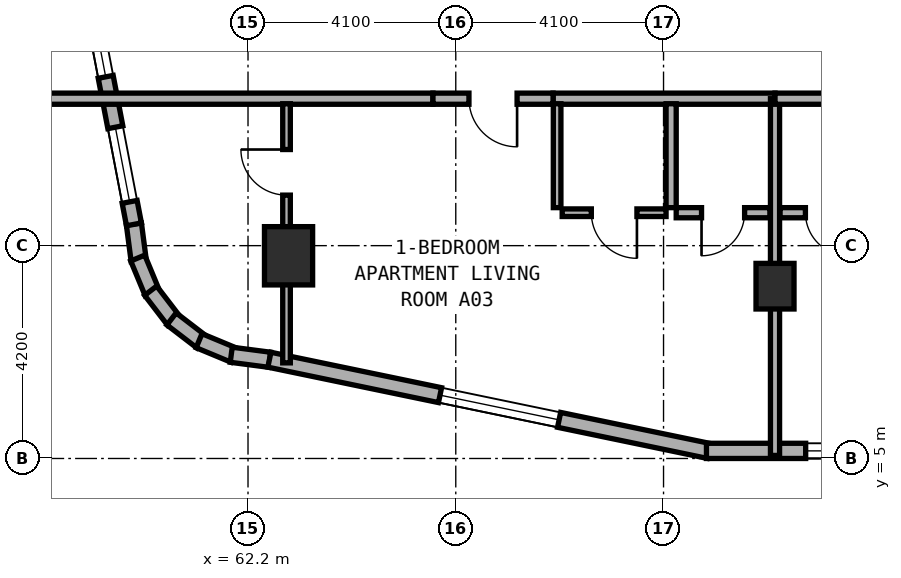
"""IFC4 building model, lengths in metres.
Left out: names, types, materials, properties, quantities, classifications, styles, units other than length and angle.
Written with IfcOpenShell. Run it as: python <this file> out.ifc"""

import sys

from ifc_helpers import new_model, si_unit, direction, frame, frame_2d, origin, origin_2d, place, context, subcontext, project, spatial, rectangle, extrude, element, fill, save


model = new_model("IFC4")
c1 = context("Model", 3, precision=1e-05, world=origin(), true_north=direction((0.0, 1.0)))
c2 = subcontext(c1, "Body", "Model", "MODEL_VIEW")
j1 = project(units=[si_unit("LENGTHUNIT", "METRE"), si_unit("PLANEANGLEUNIT", "RADIAN")], contexts=[c1])
p1 = place(None, origin())
s1 = spatial("IfcSite", under=j1, at=p1, CompositionType="ELEMENT")
p2 = place(p1, origin())
s2 = spatial("IfcBuilding", under=s1, at=p2, CompositionType="ELEMENT")
p3 = place(p2, frame((0.0, 0.0, 59.0)))
s3 = spatial("IfcBuildingStorey", under=s2, at=p3, CompositionType="ELEMENT", Elevation=59.0)
p4 = place(p3, frame((72.6, 8.4, 0.0), z_axis=(0.0, 0.0, 1.0), x_axis=(1.0, 0.0, 0.0)))
e1 = element("IfcColumn", 1, at=p4, inside=s3, PredefinedType="COLUMN", context=c2, shape_type="SweptSolid", body=[
    extrude(rectangle(XDim=0.75, YDim=0.9, at=origin_2d()), origin(), (0.0, 0.0, 1.0), 3.5),
])
p5 = place(p3, frame((63.0, 9.0, 0.0), z_axis=(0.0, 0.0, 1.0), x_axis=(1.0, 0.0, 0.0)))
e2 = element("IfcColumn", 2, at=p5, inside=s3, PredefinedType="COLUMN", context=c2, shape_type="SweptSolid", body=[
    extrude(rectangle(XDim=0.95, YDim=1.15, at=origin_2d()), origin(), (0.0, 0.0, 1.0), 3.5),
])
p6 = place(p3, frame((59.948, 9.627, 0.0), z_axis=(0.0, 0.0, 1.0), x_axis=(0.130255288807, -0.991480488834, 0.0)))
e3 = element("IfcWall", 3, at=p6, inside=s3, PredefinedType="STANDARD", context=c2, shape_type="SweptSolid", body=[
    extrude(rectangle(XDim=0.729, YDim=0.3, at=frame_2d((0.365, 0.0))), origin(), (0.0, 0.0, 1.0), 3.25),
])
for number, where, z_axis, x_axis in (
    (4, (60.024, 8.955, 0.0), (0.0, 0.0, 1.0), (0.384, -0.924, 0.0)),
    (5, (60.279, 8.311, 0.0), (0.0, 0.0, 1.0), (0.608, -0.794, 0.0)),
    (6, (60.691, 7.754, 0.0), (0.0, 0.0, 1.0), (0.794, -0.608, 0.0)),
    (7, (61.234, 7.324, 0.0), (0.0, 0.0, 1.0), (0.924, -0.383, 0.0)),
):
    element("IfcWall", number, at=place(p3, frame(where, z_axis=z_axis, x_axis=x_axis)), inside=s3, PredefinedType="STANDARD", context=c2, shape_type="SweptSolid", body=[
        extrude(rectangle(XDim=0.746, YDim=0.3, at=frame_2d((0.373, 0.0))), origin(), (0.0, 0.0, 1.0), 3.25),
    ])
p7 = place(p3, frame((61.869, 7.047, 0.0), z_axis=(0.0, 0.0, 1.0), x_axis=(0.991559404866, -0.129653178221, 0.0)))
e8 = element("IfcWall", 8, at=p7, inside=s3, PredefinedType="STANDARD", context=c2, shape_type="SweptSolid", body=[
    extrude(rectangle(XDim=0.764, YDim=0.3, at=frame_2d((0.382, 0.0))), origin(), (0.0, 0.0, 1.0), 3.25),
])
p8 = place(p3, frame((62.622, 6.949, 0.0), z_axis=(0.0, 0.0, 1.0), x_axis=(0.979119654102, -0.203284782882, 0.0)))
e9 = element("IfcWall", 9, at=p8, inside=s3, PredefinedType="STANDARD", context=c2, shape_type="SweptSolid", body=[
    extrude(rectangle(XDim=8.855, YDim=0.3, at=frame_2d((4.427, 0.0))), origin(), (0.0, 0.0, 1.0), 3.25),
])
p9 = place(p8, frame((3.439, 0.0, 0.8)))
e10 = element("IfcOpeningElement", 10, at=p9, cuts=e9, PredefinedType="OPENING", context=c2, shape_type="SweptSolid", body=[
    extrude(rectangle(XDim=2.4, YDim=1.6, at=frame_2d((1.2, 0.8))), frame((0.0, 0.16, 0.0), z_axis=(0.0, -1.0, 0.0), x_axis=(1.0, 0.0, 0.0)), (0.0, 0.0, 1.0), 0.32),
])
p10 = place(p3, frame((71.247, 5.15, 0.0), z_axis=(0.0, 0.0, 1.0), x_axis=(1.0, 0.0, 0.0)))
e11 = element("IfcWall", 11, at=p10, inside=s3, PredefinedType="STANDARD", context=c2, shape_type="SweptSolid", body=[
    extrude(rectangle(XDim=11.391, YDim=0.3, at=frame_2d((5.695, 0.0))), origin(), (0.0, 0.0, 1.0), 3.25),
])
p11 = place(p10, frame((5.113, 0.0, 0.0)))
e12 = element("IfcOpeningElement", 12, at=p11, cuts=e11, PredefinedType="OPENING", context=c2, shape_type="SweptSolid", body=[
    extrude(rectangle(XDim=1.2, YDim=2.15, at=frame_2d((0.6, 1.075))), frame((0.0, 0.16, 0.0), z_axis=(0.0, -1.0, 0.0), x_axis=(1.0, 0.0, 0.0)), (0.0, 0.0, 1.0), 0.32),
])
p12 = place(p10, frame((1.958, 0.0, 0.8)))
e13 = element("IfcOpeningElement", 13, at=p12, cuts=e11, PredefinedType="OPENING", context=c2, shape_type="SweptSolid", body=[
    extrude(rectangle(XDim=2.4, YDim=1.6, at=frame_2d((1.2, 0.8))), frame((0.0, 0.16, 0.0), z_axis=(0.0, -1.0, 0.0), x_axis=(1.0, 0.0, 0.0)), (0.0, 0.0, 1.0), 0.32),
])
p13 = place(p10, frame((7.108, 0.0, 0.8)))
e14 = element("IfcOpeningElement", 14, at=p13, cuts=e11, PredefinedType="OPENING", context=c2, shape_type="SweptSolid", body=[
    extrude(rectangle(XDim=2.4, YDim=1.6, at=frame_2d((1.2, 0.8))), frame((0.0, 0.16, 0.0), z_axis=(0.0, -1.0, 0.0), x_axis=(1.0, 0.0, 0.0)), (0.0, 0.0, 1.0), 0.32),
])
p14 = place(p3, frame((58.137, 19.082, 0.0), z_axis=(0.0, 0.0, 1.0), x_axis=(0.188087874316, -0.982152203854, 0.0)))
e15 = element("IfcWall", 15, at=p14, inside=s3, PredefinedType="STANDARD", context=c2, shape_type="SweptSolid", body=[
    extrude(rectangle(XDim=9.634, YDim=0.3, at=frame_2d((4.817, 0.0))), origin(), (0.0, 0.0, 1.0), 3.25),
])
p15 = place(p14, frame((1.255, 0.0, 0.8)))
e16 = element("IfcOpeningElement", 16, at=p15, cuts=e15, PredefinedType="OPENING", context=c2, shape_type="SweptSolid", body=[
    extrude(rectangle(XDim=2.4, YDim=1.6, at=frame_2d((1.2, 0.8))), frame((0.0, 0.16, 0.0), z_axis=(0.0, -1.0, 0.0), x_axis=(1.0, 0.0, 0.0)), (0.0, 0.0, 1.0), 0.32),
])
p16 = place(p14, frame((5.47, 0.0, 0.85)))
e17 = element("IfcOpeningElement", 17, at=p16, cuts=e15, PredefinedType="OPENING", context=c2, shape_type="SweptSolid", body=[
    extrude(rectangle(XDim=1.2, YDim=1.5, at=frame_2d((0.6, 0.75))), frame((0.0, 0.16, 0.0), z_axis=(0.0, -1.0, 0.0), x_axis=(1.0, 0.0, 0.0)), (0.0, 0.0, 1.0), 0.32),
])
p17 = place(p14, frame((7.682, 0.0, 0.85)))
e18 = element("IfcOpeningElement", 18, at=p17, cuts=e15, PredefinedType="OPENING", context=c2, shape_type="SweptSolid", body=[
    extrude(rectangle(XDim=1.5, YDim=1.5, at=frame_2d((0.75, 0.75))), frame((0.0, 0.16, 0.0), z_axis=(0.0, -1.0, 0.0), x_axis=(1.0, 0.0, 0.0)), (0.0, 0.0, 1.0), 0.32),
])
p18 = place(p3, frame((58.16, 12.1, 0.0), z_axis=(0.0, 0.0, 1.0), x_axis=(1.0, 0.0, 0.0)))
e19 = element("IfcWall", 19, at=p18, inside=s3, PredefinedType="SOLIDWALL", context=c2, shape_type="SweptSolid", body=[
    extrude(rectangle(XDim=7.69, YDim=0.22, at=frame_2d((3.845, 0.0))), origin(), (0.0, 0.0, 1.0), 2.865),
])
p19 = place(p3, frame((68.22, 12.1, 0.0), z_axis=(0.0, 0.0, 1.0), x_axis=(1.0, 0.0, 0.0)))
e20 = element("IfcWall", 20, at=p19, inside=s3, PredefinedType="SOLIDWALL", context=c2, shape_type="SweptSolid", body=[
    extrude(rectangle(XDim=4.38, YDim=0.22, at=frame_2d((2.19, 0.0))), origin(), (0.0, 0.0, 1.0), 2.725),
])
p20 = place(p3, frame((65.85, 12.1, 0.0), z_axis=(0.0, 0.0, 1.0), x_axis=(1.0, 0.0, 0.0)))
e21 = element("IfcWall", 21, at=p20, inside=s3, PredefinedType="SOLIDWALL", context=c2, shape_type="SweptSolid", body=[
    extrude(rectangle(XDim=2.37, YDim=0.22, at=frame_2d((1.185, 0.0))), origin(), (0.0, 0.0, 1.0), 3.22),
])
p21 = place(p20, frame((0.71, 0.0, 0.0)))
e22 = element("IfcOpeningElement", 22, at=p21, cuts=e21, PredefinedType="OPENING", context=c2, shape_type="SweptSolid", body=[
    extrude(rectangle(XDim=0.95, YDim=2.1, at=frame_2d((0.475, 1.05))), frame((0.0, 0.12, 0.0), z_axis=(0.0, -1.0, 0.0), x_axis=(1.0, 0.0, 0.0)), (0.0, 0.0, 1.0), 0.24),
])
p22 = place(p3, frame((62.96, 6.887, 0.0), z_axis=(0.0, 0.0, 1.0), x_axis=(0.0, 1.0, 0.0)))
e23 = element("IfcWall", 23, at=p22, inside=s3, PredefinedType="PARTITIONING", context=c2, shape_type="SweptSolid", body=[
    extrude(rectangle(XDim=5.113, YDim=0.15, at=frame_2d((2.557, 0.0))), origin(), (0.0, 0.0, 1.0), 2.865),
])
p23 = place(p22, frame((3.31, 0.0, 0.0)))
e24 = element("IfcOpeningElement", 24, at=p23, cuts=e23, PredefinedType="OPENING", context=c2, shape_type="SweptSolid", body=[
    extrude(rectangle(XDim=0.9, YDim=2.1, at=frame_2d((0.45, 1.05))), frame((0.0, 0.085, 0.0), z_axis=(0.0, -1.0, 0.0), x_axis=(1.0, 0.0, 0.0)), (0.0, 0.0, 1.0), 0.17),
])
p24 = place(p3, frame((70.55, 9.95, 0.0), z_axis=(0.0, 0.0, 1.0), x_axis=(0.0, 1.0, 0.0)))
e25 = element("IfcWall", 25, at=p24, inside=s3, PredefinedType="PLUMBINGWALL", context=c2, shape_type="SweptSolid", body=[
    extrude(rectangle(XDim=2.05, YDim=0.2, at=frame_2d((1.025, 0.0))), origin(), (0.0, 0.0, 1.0), 3.22),
])
p25 = place(p3, frame((68.3, 9.95, 0.0), z_axis=(0.0, 0.0, 1.0), x_axis=(0.0, 1.0, 0.0)))
e26 = element("IfcWall", 26, at=p25, inside=s3, PredefinedType="PARTITIONING", context=c2, shape_type="SweptSolid", body=[
    extrude(rectangle(XDim=2.05, YDim=0.15, at=frame_2d((1.025, 0.0))), origin(), (0.0, 0.0, 1.0), 3.22),
])
p26 = place(p3, frame((70.65, 9.85, 0.0), z_axis=(0.0, 0.0, 1.0), x_axis=(1.0, 0.0, 0.0)))
e27 = element("IfcWall", 27, at=p26, inside=s3, PredefinedType="PLUMBINGWALL", context=c2, shape_type="SweptSolid", body=[
    extrude(rectangle(XDim=1.85, YDim=0.2, at=frame_2d((0.925, 0.0))), origin(), (0.0, 0.0, 1.0), 3.22),
])
p27 = place(p26, frame((0.5, 0.0, 0.0)))
e28 = element("IfcOpeningElement", 28, at=p27, cuts=e27, PredefinedType="OPENING", context=c2, shape_type="SweptSolid", body=[
    extrude(rectangle(XDim=0.85, YDim=2.1, at=frame_2d((0.425, 1.05))), frame((0.0, 0.11, 0.0), z_axis=(0.0, -1.0, 0.0), x_axis=(1.0, 0.0, 0.0)), (0.0, 0.0, 1.0), 0.22),
])
p28 = place(p3, frame((68.4, 9.85, 0.0), z_axis=(0.0, 0.0, 1.0), x_axis=(1.0, 0.0, 0.0)))
e29 = element("IfcWall", 29, at=p28, inside=s3, PredefinedType="PARTITIONING", context=c2, shape_type="SweptSolid", body=[
    extrude(rectangle(XDim=2.05, YDim=0.15, at=frame_2d((1.025, 0.0))), origin(), (0.0, 0.0, 1.0), 3.22),
])
p29 = place(p28, frame((0.575, 0.0, 0.0)))
e30 = element("IfcOpeningElement", 30, at=p29, cuts=e29, PredefinedType="OPENING", context=c2, shape_type="SweptSolid", body=[
    extrude(rectangle(XDim=0.9, YDim=2.1, at=frame_2d((0.45, 1.05))), frame((0.0, 0.085, 0.0), z_axis=(0.0, -1.0, 0.0), x_axis=(1.0, 0.0, 0.0)), (0.0, 0.0, 1.0), 0.17),
])
p30 = place(p3, frame((72.6, 5.06, 0.0), z_axis=(0.0, 0.0, 1.0), x_axis=(0.0, 1.0, 0.0)))
e31 = element("IfcWall", 31, at=p30, inside=s3, PredefinedType="SOLIDWALL", context=c2, shape_type="SweptSolid", body=[
    extrude(rectangle(XDim=7.04, YDim=0.18, at=frame_2d((3.52, 0.0))), origin(), (0.0, 0.0, 1.0), 2.725),
])
p31 = place(p3, frame((72.6, 12.1, 0.0), z_axis=(0.0, 0.0, 1.0), x_axis=(1.0, 0.0, 0.0)))
e32 = element("IfcWall", 32, at=p31, inside=s3, PredefinedType="SOLIDWALL", context=c2, shape_type="SweptSolid", body=[
    extrude(rectangle(XDim=4.38, YDim=0.22, at=frame_2d((2.19, 0.0))), origin(), (0.0, 0.0, 1.0), 2.725),
])
p32 = place(p3, frame((72.7, 9.85, 0.0), z_axis=(0.0, 0.0, 1.0), x_axis=(1.0, 0.0, 0.0)))
e33 = element("IfcWall", 33, at=p32, inside=s3, PredefinedType="PLUMBINGWALL", context=c2, shape_type="SweptSolid", body=[
    extrude(rectangle(XDim=1.85, YDim=0.2, at=frame_2d((0.925, 0.0))), origin(), (0.0, 0.0, 1.0), 3.22),
])
p33 = place(p32, frame((0.5, 0.0, 0.0)))
e34 = element("IfcOpeningElement", 34, at=p33, cuts=e33, PredefinedType="OPENING", context=c2, shape_type="SweptSolid", body=[
    extrude(rectangle(XDim=0.85, YDim=2.1, at=frame_2d((0.425, 1.05))), frame((0.0, 0.11, 0.0), z_axis=(0.0, -1.0, 0.0), x_axis=(1.0, 0.0, 0.0)), (0.0, 0.0, 1.0), 0.22),
])
p34 = place(p9, origin())
e35 = element("IfcWindow", 35, at=p34, inside=s3, PartitioningType="SINGLE_PANEL", PredefinedType="WINDOW", context=c2, shape_type="SweptSolid", body=[
    extrude(rectangle(XDim=2.4, YDim=1.6, at=frame_2d((1.2, 0.8))), frame((0.0, 0.03, 0.0), z_axis=(0.0, -1.0, 0.0), x_axis=(1.0, 0.0, 0.0)), (0.0, 0.0, 1.0), 0.06),
])
fill(e10, e35)
p35 = place(p12, origin())
e36 = element("IfcWindow", 36, at=p35, inside=s3, PartitioningType="SINGLE_PANEL", PredefinedType="WINDOW", context=c2, shape_type="SweptSolid", body=[
    extrude(rectangle(XDim=2.4, YDim=1.6, at=frame_2d((1.2, 0.8))), frame((0.0, 0.03, 0.0), z_axis=(0.0, -1.0, 0.0), x_axis=(1.0, 0.0, 0.0)), (0.0, 0.0, 1.0), 0.06),
])
fill(e13, e36)
p36 = place(p16, origin())
e37 = element("IfcWindow", 37, at=p36, inside=s3, PartitioningType="SINGLE_PANEL", PredefinedType="WINDOW", context=c2, shape_type="SweptSolid", body=[
    extrude(rectangle(XDim=1.2, YDim=1.5, at=frame_2d((0.6, 0.75))), frame((0.0, 0.03, 0.0), z_axis=(0.0, -1.0, 0.0), x_axis=(1.0, 0.0, 0.0)), (0.0, 0.0, 1.0), 0.06),
])
fill(e17, e37)
p37 = place(p17, origin())
e38 = element("IfcWindow", 38, at=p37, inside=s3, PartitioningType="SINGLE_PANEL", PredefinedType="WINDOW", context=c2, shape_type="SweptSolid", body=[
    extrude(rectangle(XDim=1.5, YDim=1.5, at=frame_2d((0.75, 0.75))), frame((0.0, 0.03, 0.0), z_axis=(0.0, -1.0, 0.0), x_axis=(1.0, 0.0, 0.0)), (0.0, 0.0, 1.0), 0.06),
])
fill(e18, e38)
p38 = place(p21, frame((0.95, 0.0, 0.0), z_axis=(0.0, 0.0, 1.0), x_axis=(-1.0, 0.0, 0.0)))
e39 = element("IfcDoor", 39, at=p38, inside=s3, OperationType="SINGLE_SWING_LEFT", PredefinedType="DOOR", context=c2, shape_type="SweptSolid", body=[
    extrude(rectangle(XDim=0.95, YDim=2.1, at=frame_2d((0.475, 1.05))), frame((0.0, 0.025, 0.0), z_axis=(0.0, -1.0, 0.0), x_axis=(1.0, 0.0, 0.0)), (0.0, 0.0, 1.0), 0.05),
])
fill(e22, e39)
p39 = place(p23, origin())
e40 = element("IfcDoor", 40, at=p39, inside=s3, OperationType="SINGLE_SWING_RIGHT", PredefinedType="DOOR", context=c2, shape_type="SweptSolid", body=[
    extrude(rectangle(XDim=0.9, YDim=2.1, at=frame_2d((0.45, 1.05))), frame((0.0, 0.025, 0.0), z_axis=(0.0, -1.0, 0.0), x_axis=(1.0, 0.0, 0.0)), (0.0, 0.0, 1.0), 0.05),
])
fill(e24, e40)
p40 = place(p27, frame((0.85, 0.0, 0.0), z_axis=(0.0, 0.0, 1.0), x_axis=(-1.0, 0.0, 0.0)))
e41 = element("IfcDoor", 41, at=p40, inside=s3, OperationType="SINGLE_SWING_RIGHT", PredefinedType="DOOR", context=c2, shape_type="SweptSolid", body=[
    extrude(rectangle(XDim=0.85, YDim=2.1, at=frame_2d((0.425, 1.05))), frame((0.0, 0.025, 0.0), z_axis=(0.0, -1.0, 0.0), x_axis=(1.0, 0.0, 0.0)), (0.0, 0.0, 1.0), 0.05),
])
fill(e28, e41)
p41 = place(p29, frame((0.9, 0.0, 0.0), z_axis=(0.0, 0.0, 1.0), x_axis=(-1.0, 0.0, 0.0)))
e42 = element("IfcDoor", 42, at=p41, inside=s3, OperationType="SINGLE_SWING_LEFT", PredefinedType="DOOR", context=c2, shape_type="SweptSolid", body=[
    extrude(rectangle(XDim=0.9, YDim=2.1, at=frame_2d((0.45, 1.05))), frame((0.0, 0.025, 0.0), z_axis=(0.0, -1.0, 0.0), x_axis=(1.0, 0.0, 0.0)), (0.0, 0.0, 1.0), 0.05),
])
fill(e30, e42)
p42 = place(p33, frame((0.85, 0.0, 0.0), z_axis=(0.0, 0.0, 1.0), x_axis=(-1.0, 0.0, 0.0)))
e43 = element("IfcDoor", 43, at=p42, inside=s3, OperationType="SINGLE_SWING_LEFT", PredefinedType="DOOR", context=c2, shape_type="SweptSolid", body=[
    extrude(rectangle(XDim=0.85, YDim=2.1, at=frame_2d((0.425, 1.05))), frame((0.0, 0.025, 0.0), z_axis=(0.0, -1.0, 0.0), x_axis=(1.0, 0.0, 0.0)), (0.0, 0.0, 1.0), 0.05),
])
fill(e34, e43)
save(model, sys.argv[1])
